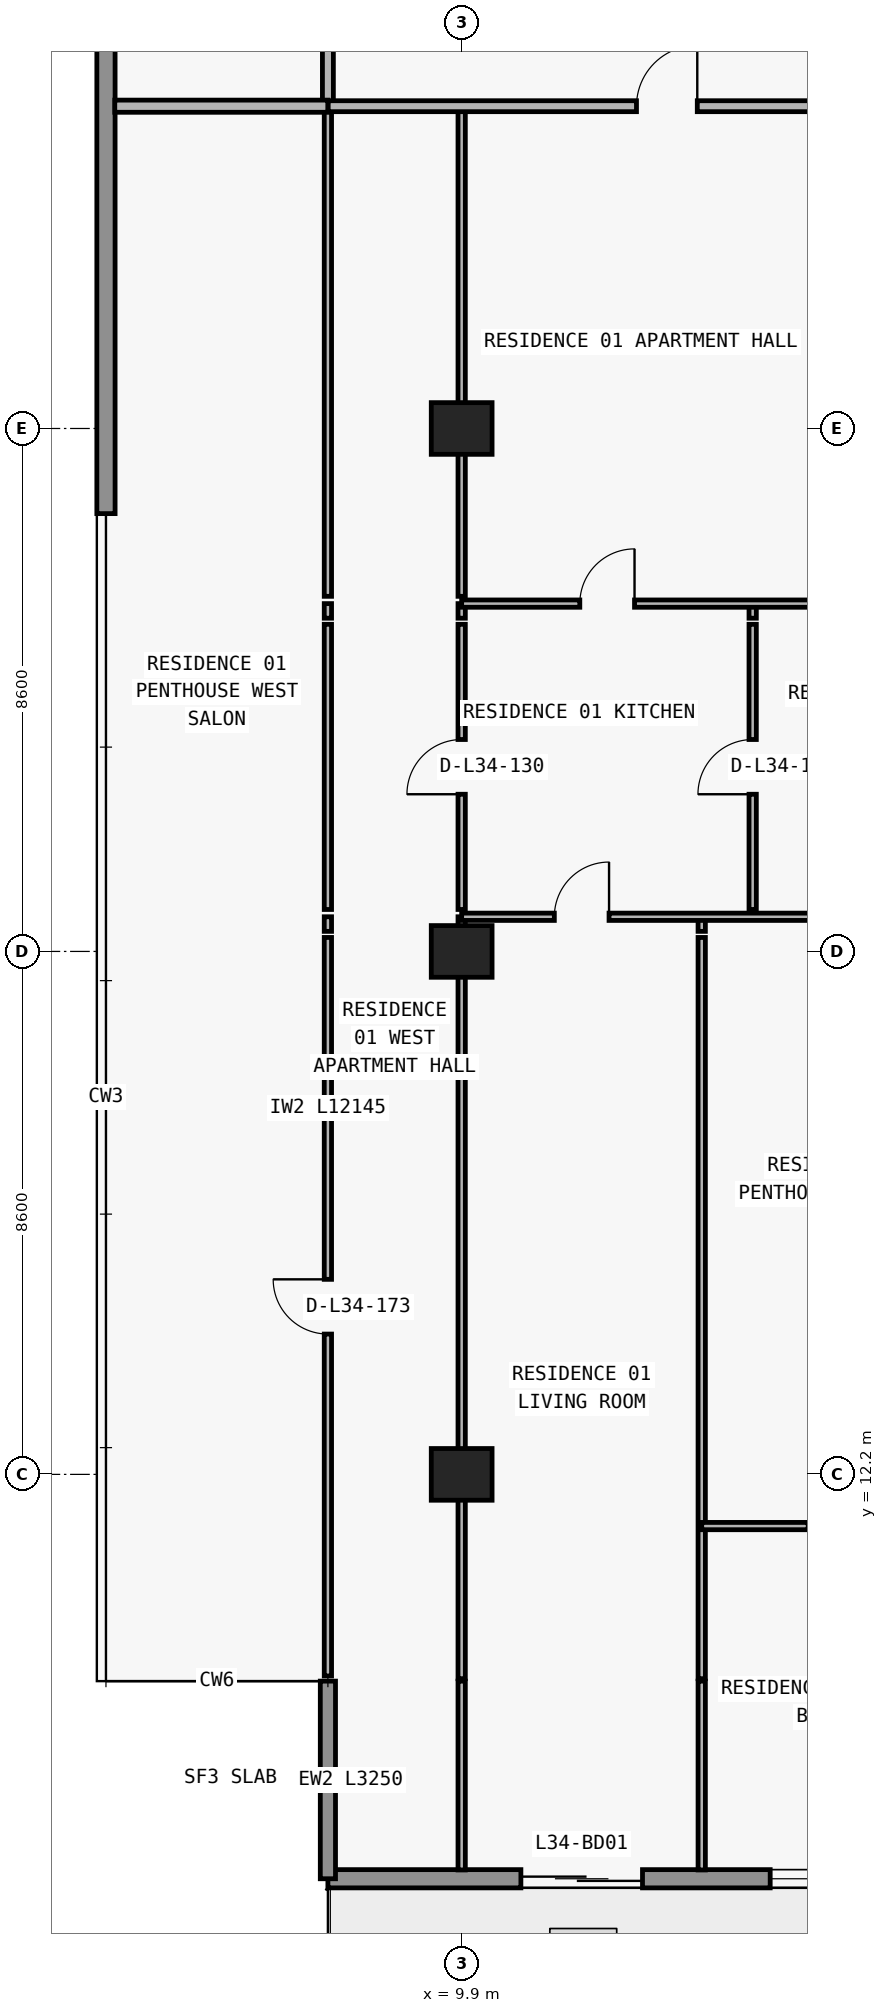
"""IFC4 building model, lengths in metres.
Left out: names, types, materials, properties, quantities, classifications, styles, units other than length and angle.
Written with IfcOpenShell. Run it as: python <this file> out.ifc"""

import sys

from ifc_helpers import new_model, si_unit, direction, frame, frame_2d, origin, origin_2d, place, context, subcontext, project, spatial, rectangle, extrude, element, fill, save


model = new_model("IFC4")
c1 = context("Model", 3, precision=1e-05, world=origin(), true_north=direction((0.0, 1.0)))
c2 = subcontext(c1, "Body", "Model", "MODEL_VIEW")
j1 = project(units=[si_unit("LENGTHUNIT", "METRE"), si_unit("PLANEANGLEUNIT", "RADIAN")], contexts=[c1])
p1 = place(None, origin())
s1 = spatial("IfcSite", under=j1, at=p1, CompositionType="ELEMENT")
p2 = place(p1, origin())
s2 = spatial("IfcBuilding", under=s1, at=p2, CompositionType="ELEMENT")
p3 = place(p2, frame((0.0, 0.0, 125.7)))
s3 = spatial("IfcBuildingStorey", under=s2, at=p3, CompositionType="ELEMENT", Elevation=125.7)
for number, where, z_axis, x_axis in (
    (1, (9.9, 12.2, 0.0), (0.0, 0.0, 1.0), (1.0, 0.0, 0.0)),
    (2, (9.9, 20.8, 0.0), (0.0, 0.0, 1.0), (1.0, 0.0, 0.0)),
    (3, (9.9, 29.4, 0.0), (0.0, 0.0, 1.0), (1.0, 0.0, 0.0)),
):
    element("IfcColumn", number, at=place(p3, frame(where, z_axis=z_axis, x_axis=x_axis)), inside=s3, PredefinedType="COLUMN", context=c2, shape_type="SweptSolid", body=[
        extrude(rectangle(XDim=1.0, YDim=0.85, at=origin_2d()), origin(), (0.0, 0.0, 1.0), 3.05),
    ])
p4 = place(p3, frame((70.1, 5.55, 0.0), z_axis=(0.0, 0.0, 1.0), x_axis=(-1.0, 0.0, 0.0)))
e4 = element("IfcWall", 4, at=p4, inside=s3, PredefinedType="STANDARD", context=c2, shape_type="SweptSolid", body=[
    extrude(rectangle(XDim=62.4, YDim=0.3, at=frame_2d((31.2, 0.0))), origin(), (0.0, 0.0, 1.0), 3.05),
])
p5 = place(p4, frame((57.226, 0.0, 0.0)))
e5 = element("IfcOpeningElement", 5, at=p5, cuts=e4, PredefinedType="OPENING", context=c2, shape_type="SweptSolid", body=[
    extrude(rectangle(XDim=2.0, YDim=2.3, at=frame_2d((1.0, 1.15))), frame((0.0, 0.16, 0.0), z_axis=(0.0, -1.0, 0.0), x_axis=(1.0, 0.0, 0.0)), (0.0, 0.0, 1.0), 0.32),
])
p6 = place(p4, frame((52.926, 0.0, 0.85)))
e6 = element("IfcOpeningElement", 6, at=p6, cuts=e4, PredefinedType="OPENING", context=c2, shape_type="SweptSolid", body=[
    extrude(rectangle(XDim=2.2, YDim=1.55, at=frame_2d((1.1, 0.775))), frame((0.0, 0.16, 0.0), z_axis=(0.0, -1.0, 0.0), x_axis=(1.0, 0.0, 0.0)), (0.0, 0.0, 1.0), 0.32),
])
p7 = place(p4, frame((48.49, 0.0, 0.0)))
e7 = element("IfcOpeningElement", 7, at=p7, cuts=e4, PredefinedType="OPENING", context=c2, shape_type="SweptSolid", body=[
    extrude(rectangle(XDim=2.0, YDim=2.3, at=frame_2d((1.0, 1.15))), frame((0.0, 0.16, 0.0), z_axis=(0.0, -1.0, 0.0), x_axis=(1.0, 0.0, 0.0)), (0.0, 0.0, 1.0), 0.32),
])
p8 = place(p4, frame((44.39, 0.0, 0.85)))
e8 = element("IfcOpeningElement", 8, at=p8, cuts=e4, PredefinedType="OPENING", context=c2, shape_type="SweptSolid", body=[
    extrude(rectangle(XDim=1.8, YDim=1.55, at=frame_2d((0.9, 0.775))), frame((0.0, 0.16, 0.0), z_axis=(0.0, -1.0, 0.0), x_axis=(1.0, 0.0, 0.0)), (0.0, 0.0, 1.0), 0.32),
])
p9 = place(p4, frame((40.426, 0.0, 0.0)))
e9 = element("IfcOpeningElement", 9, at=p9, cuts=e4, PredefinedType="OPENING", context=c2, shape_type="SweptSolid", body=[
    extrude(rectangle(XDim=2.0, YDim=2.3, at=frame_2d((1.0, 1.15))), frame((0.0, 0.16, 0.0), z_axis=(0.0, -1.0, 0.0), x_axis=(1.0, 0.0, 0.0)), (0.0, 0.0, 1.0), 0.32),
])
p10 = place(p4, frame((36.126, 0.0, 0.85)))
e10 = element("IfcOpeningElement", 10, at=p10, cuts=e4, PredefinedType="OPENING", context=c2, shape_type="SweptSolid", body=[
    extrude(rectangle(XDim=2.2, YDim=1.55, at=frame_2d((1.1, 0.775))), frame((0.0, 0.16, 0.0), z_axis=(0.0, -1.0, 0.0), x_axis=(1.0, 0.0, 0.0)), (0.0, 0.0, 1.0), 0.32),
])
p11 = place(p4, frame((31.91, 0.0, 0.0)))
e11 = element("IfcOpeningElement", 11, at=p11, cuts=e4, PredefinedType="OPENING", context=c2, shape_type="SweptSolid", body=[
    extrude(rectangle(XDim=2.0, YDim=2.3, at=frame_2d((1.0, 1.15))), frame((0.0, 0.16, 0.0), z_axis=(0.0, -1.0, 0.0), x_axis=(1.0, 0.0, 0.0)), (0.0, 0.0, 1.0), 0.32),
])
p12 = place(p4, frame((28.21, 0.0, 0.85)))
e12 = element("IfcOpeningElement", 12, at=p12, cuts=e4, PredefinedType="OPENING", context=c2, shape_type="SweptSolid", body=[
    extrude(rectangle(XDim=1.8, YDim=1.55, at=frame_2d((0.9, 0.775))), frame((0.0, 0.16, 0.0), z_axis=(0.0, -1.0, 0.0), x_axis=(1.0, 0.0, 0.0)), (0.0, 0.0, 1.0), 0.32),
])
p13 = place(p4, frame((24.426, 0.0, 0.0)))
e13 = element("IfcOpeningElement", 13, at=p13, cuts=e4, PredefinedType="OPENING", context=c2, shape_type="SweptSolid", body=[
    extrude(rectangle(XDim=2.0, YDim=2.3, at=frame_2d((1.0, 1.15))), frame((0.0, 0.16, 0.0), z_axis=(0.0, -1.0, 0.0), x_axis=(1.0, 0.0, 0.0)), (0.0, 0.0, 1.0), 0.32),
])
p14 = place(p4, frame((20.126, 0.0, 0.85)))
e14 = element("IfcOpeningElement", 14, at=p14, cuts=e4, PredefinedType="OPENING", context=c2, shape_type="SweptSolid", body=[
    extrude(rectangle(XDim=2.2, YDim=1.55, at=frame_2d((1.1, 0.775))), frame((0.0, 0.16, 0.0), z_axis=(0.0, -1.0, 0.0), x_axis=(1.0, 0.0, 0.0)), (0.0, 0.0, 1.0), 0.32),
])
p15 = place(p4, frame((15.69, 0.0, 0.0)))
e15 = element("IfcOpeningElement", 15, at=p15, cuts=e4, PredefinedType="OPENING", context=c2, shape_type="SweptSolid", body=[
    extrude(rectangle(XDim=2.0, YDim=2.3, at=frame_2d((1.0, 1.15))), frame((0.0, 0.16, 0.0), z_axis=(0.0, -1.0, 0.0), x_axis=(1.0, 0.0, 0.0)), (0.0, 0.0, 1.0), 0.32),
])
p16 = place(p4, frame((11.59, 0.0, 0.85)))
e16 = element("IfcOpeningElement", 16, at=p16, cuts=e4, PredefinedType="OPENING", context=c2, shape_type="SweptSolid", body=[
    extrude(rectangle(XDim=1.8, YDim=1.55, at=frame_2d((0.9, 0.775))), frame((0.0, 0.16, 0.0), z_axis=(0.0, -1.0, 0.0), x_axis=(1.0, 0.0, 0.0)), (0.0, 0.0, 1.0), 0.32),
])
p17 = place(p4, frame((7.626, 0.0, 0.0)))
e17 = element("IfcOpeningElement", 17, at=p17, cuts=e4, PredefinedType="OPENING", context=c2, shape_type="SweptSolid", body=[
    extrude(rectangle(XDim=2.0, YDim=2.3, at=frame_2d((1.0, 1.15))), frame((0.0, 0.16, 0.0), z_axis=(0.0, -1.0, 0.0), x_axis=(1.0, 0.0, 0.0)), (0.0, 0.0, 1.0), 0.32),
])
p18 = place(p4, frame((3.326, 0.0, 0.85)))
e18 = element("IfcOpeningElement", 18, at=p18, cuts=e4, PredefinedType="OPENING", context=c2, shape_type="SweptSolid", body=[
    extrude(rectangle(XDim=2.2, YDim=1.55, at=frame_2d((1.1, 0.775))), frame((0.0, 0.16, 0.0), z_axis=(0.0, -1.0, 0.0), x_axis=(1.0, 0.0, 0.0)), (0.0, 0.0, 1.0), 0.32),
])
p19 = place(p3, frame((7.7, 8.8, 0.0), z_axis=(0.0, 0.0, 1.0), x_axis=(0.0, -1.0, 0.0)))
e19 = element("IfcWall", 19, at=p19, inside=s3, PredefinedType="ELEMENTEDWALL", context=c2, shape_type="SweptSolid", body=[
    extrude(rectangle(XDim=3.25, YDim=0.25, at=frame_2d((1.625, 0.0))), origin(), (0.0, 0.0, 1.0), 3.05),
])
p20 = place(p3, frame((4.05, 28.0, 0.0), z_axis=(0.0, 0.0, 1.0), x_axis=(0.0, 1.0, 0.0)))
e20 = element("IfcWall", 20, at=p20, inside=s3, PredefinedType="STANDARD", context=c2, shape_type="SweptSolid", body=[
    extrude(rectangle(XDim=19.2, YDim=0.3, at=frame_2d((9.6, 0.0))), origin(), (0.0, 0.0, 1.0), 3.05),
])
p21 = place(p3, frame((7.7, 8.885, 0.0), z_axis=(0.0, 0.0, 1.0), x_axis=(0.0, 1.0, 0.0)))
e21 = element("IfcWall", 21, at=p21, inside=s3, PredefinedType="PARTITIONING", context=c2, shape_type="SweptSolid", body=[
    extrude(rectangle(XDim=12.145, YDim=0.12, at=frame_2d((6.073, 0.0))), origin(), (0.0, 0.0, 1.0), 3.05),
])
p22 = place(p21, frame((5.623, 0.0, 0.0)))
e22 = element("IfcOpeningElement", 22, at=p22, cuts=e21, PredefinedType="OPENING", context=c2, shape_type="SweptSolid", body=[
    extrude(rectangle(XDim=0.9, YDim=2.15, at=frame_2d((0.45, 1.075))), frame((0.0, 0.07, 0.0), z_axis=(0.0, -1.0, 0.0), x_axis=(1.0, 0.0, 0.0)), (0.0, 0.0, 1.0), 0.14),
])
p23 = place(p3, frame((7.7, 21.13, 0.0), z_axis=(0.0, 0.0, 1.0), x_axis=(0.0, 1.0, 0.0)))
e23 = element("IfcWall", 23, at=p23, inside=s3, PredefinedType="PARTITIONING", context=c2, shape_type="SweptSolid", body=[
    extrude(rectangle(XDim=0.24, YDim=0.12, at=frame_2d((0.12, 0.0))), origin(), (0.0, 0.0, 1.0), 3.05),
])
p24 = place(p3, frame((7.7, 21.49, 0.0), z_axis=(0.0, 0.0, 1.0), x_axis=(0.0, 1.0, 0.0)))
e24 = element("IfcWall", 24, at=p24, inside=s3, PredefinedType="PARTITIONING", context=c2, shape_type="SweptSolid", body=[
    extrude(rectangle(XDim=4.69, YDim=0.12, at=frame_2d((2.345, 0.0))), origin(), (0.0, 0.0, 1.0), 3.05),
])
p25 = place(p3, frame((7.7, 26.28, 0.0), z_axis=(0.0, 0.0, 1.0), x_axis=(0.0, 1.0, 0.0)))
e25 = element("IfcWall", 25, at=p25, inside=s3, PredefinedType="PARTITIONING", context=c2, shape_type="SweptSolid", body=[
    extrude(rectangle(XDim=0.24, YDim=0.12, at=frame_2d((0.12, 0.0))), origin(), (0.0, 0.0, 1.0), 3.05),
])
p26 = place(p3, frame((7.7, 26.64, 0.0), z_axis=(0.0, 0.0, 1.0), x_axis=(0.0, 1.0, 0.0)))
e26 = element("IfcWall", 26, at=p26, inside=s3, PredefinedType="PARTITIONING", context=c2, shape_type="SweptSolid", body=[
    extrude(rectangle(XDim=8.06, YDim=0.12, at=frame_2d((4.03, 0.0))), origin(), (0.0, 0.0, 1.0), 3.05),
])
p27 = place(p3, frame((7.7, 34.705, 0.0), z_axis=(0.0, 0.0, 1.0), x_axis=(0.0, 1.0, 0.0)))
e27 = element("IfcWall", 27, at=p27, inside=s3, PredefinedType="PARTITIONING", context=c2, shape_type="SweptSolid", body=[
    extrude(rectangle(XDim=2.245, YDim=0.18, at=frame_2d((1.123, 0.0))), origin(), (0.0, 0.0, 1.0), 3.05),
])
p28 = place(p3, frame((9.9, 5.695, 0.0), z_axis=(0.0, 0.0, 1.0), x_axis=(0.0, 1.0, 0.0)))
e28 = element("IfcWall", 28, at=p28, inside=s3, PredefinedType="PARTITIONING", context=c2, shape_type="SweptSolid", body=[
    extrude(rectangle(XDim=3.105, YDim=0.12, at=frame_2d((1.552, 0.0))), origin(), (0.0, 0.0, 1.0), 3.05),
])
p29 = place(p3, frame((9.9, 8.84, 0.0), z_axis=(0.0, 0.0, 1.0), x_axis=(0.0, 1.0, 0.0)))
e29 = element("IfcWall", 29, at=p29, inside=s3, PredefinedType="PARTITIONING", context=c2, shape_type="SweptSolid", body=[
    extrude(rectangle(XDim=12.19, YDim=0.12, at=frame_2d((6.095, 0.0))), origin(), (0.0, 0.0, 1.0), 2.174),
])
p30 = place(p3, frame((9.9, 21.13, 0.0), z_axis=(0.0, 0.0, 1.0), x_axis=(0.0, 1.0, 0.0)))
e30 = element("IfcWall", 30, at=p30, inside=s3, PredefinedType="PARTITIONING", context=c2, shape_type="SweptSolid", body=[
    extrude(rectangle(XDim=0.24, YDim=0.12, at=frame_2d((0.12, 0.0))), origin(), (0.0, 0.0, 1.0), 2.174),
])
p31 = place(p3, frame((9.9, 21.49, 0.0), z_axis=(0.0, 0.0, 1.0), x_axis=(0.0, 1.0, 0.0)))
e31 = element("IfcWall", 31, at=p31, inside=s3, PredefinedType="PARTITIONING", context=c2, shape_type="SweptSolid", body=[
    extrude(rectangle(XDim=4.69, YDim=0.12, at=frame_2d((2.345, 0.0))), origin(), (0.0, 0.0, 1.0), 2.174),
])
p32 = place(p31, frame((1.895, 0.0, 0.0)))
e32 = element("IfcOpeningElement", 32, at=p32, cuts=e31, PredefinedType="OPENING", context=c2, shape_type="SweptSolid", body=[
    extrude(rectangle(XDim=0.9, YDim=2.124, at=frame_2d((0.45, 1.062))), frame((0.0, 0.07, 0.0), z_axis=(0.0, -1.0, 0.0), x_axis=(1.0, 0.0, 0.0)), (0.0, 0.0, 1.0), 0.14),
])
p33 = place(p3, frame((9.9, 26.28, 0.0), z_axis=(0.0, 0.0, 1.0), x_axis=(0.0, 1.0, 0.0)))
e33 = element("IfcWall", 33, at=p33, inside=s3, PredefinedType="PARTITIONING", context=c2, shape_type="SweptSolid", body=[
    extrude(rectangle(XDim=0.24, YDim=0.12, at=frame_2d((0.12, 0.0))), origin(), (0.0, 0.0, 1.0), 2.174),
])
p34 = place(p3, frame((9.9, 26.64, 0.0), z_axis=(0.0, 0.0, 1.0), x_axis=(0.0, 1.0, 0.0)))
e34 = element("IfcWall", 34, at=p34, inside=s3, PredefinedType="PARTITIONING", context=c2, shape_type="SweptSolid", body=[
    extrude(rectangle(XDim=8.06, YDim=0.12, at=frame_2d((4.03, 0.0))), origin(), (0.0, 0.0, 1.0), 2.174),
])
p35 = place(p3, frame((13.848, 5.695, 0.0), z_axis=(0.0, 0.0, 1.0), x_axis=(0.0, 1.0, 0.0)))
e35 = element("IfcWall", 35, at=p35, inside=s3, PredefinedType="PARTITIONING", context=c2, shape_type="SweptSolid", body=[
    extrude(rectangle(XDim=3.105, YDim=0.12, at=frame_2d((1.552, 0.0))), origin(), (0.0, 0.0, 1.0), 3.05),
])
p36 = place(p3, frame((13.848, 8.84, 0.0), z_axis=(0.0, 0.0, 1.0), x_axis=(0.0, 1.0, 0.0)))
e36 = element("IfcWall", 36, at=p36, inside=s3, PredefinedType="PARTITIONING", context=c2, shape_type="SweptSolid", body=[
    extrude(rectangle(XDim=12.19, YDim=0.12, at=frame_2d((6.095, 0.0))), origin(), (0.0, 0.0, 1.0), 3.05),
])
p37 = place(p3, frame((13.848, 21.13, 0.0), z_axis=(0.0, 0.0, 1.0), x_axis=(0.0, 1.0, 0.0)))
e37 = element("IfcWall", 37, at=p37, inside=s3, PredefinedType="PARTITIONING", context=c2, shape_type="SweptSolid", body=[
    extrude(rectangle(XDim=0.24, YDim=0.12, at=frame_2d((0.12, 0.0))), origin(), (0.0, 0.0, 1.0), 3.05),
])
p38 = place(p3, frame((14.686, 21.49, 0.0), z_axis=(0.0, 0.0, 1.0), x_axis=(0.0, 1.0, 0.0)))
e38 = element("IfcWall", 38, at=p38, inside=s3, PredefinedType="PARTITIONING", context=c2, shape_type="SweptSolid", body=[
    extrude(rectangle(XDim=4.69, YDim=0.12, at=frame_2d((2.345, 0.0))), origin(), (0.0, 0.0, 1.0), 3.05),
])
p39 = place(p38, frame((1.895, 0.0, 0.0)))
e39 = element("IfcOpeningElement", 39, at=p39, cuts=e38, PredefinedType="OPENING", context=c2, shape_type="SweptSolid", body=[
    extrude(rectangle(XDim=0.9, YDim=2.15, at=frame_2d((0.45, 1.075))), frame((0.0, 0.07, 0.0), z_axis=(0.0, -1.0, 0.0), x_axis=(1.0, 0.0, 0.0)), (0.0, 0.0, 1.0), 0.14),
])
p40 = place(p3, frame((14.686, 26.28, 0.0), z_axis=(0.0, 0.0, 1.0), x_axis=(0.0, 1.0, 0.0)))
e40 = element("IfcWall", 40, at=p40, inside=s3, PredefinedType="PARTITIONING", context=c2, shape_type="SweptSolid", body=[
    extrude(rectangle(XDim=0.24, YDim=0.12, at=frame_2d((0.12, 0.0))), origin(), (0.0, 0.0, 1.0), 3.05),
])
p41 = place(p3, frame((13.848, 11.35, 0.0), z_axis=(0.0, 0.0, 1.0), x_axis=(1.0, 0.0, 0.0)))
e41 = element("IfcWall", 41, at=p41, inside=s3, PredefinedType="PARTITIONING", context=c2, shape_type="SweptSolid", body=[
    extrude(rectangle(XDim=4.402, YDim=0.12, at=frame_2d((2.201, 0.0))), origin(), (0.0, 0.0, 1.0), 3.05),
])
p42 = place(p41, frame((1.751, 0.0, 0.0)))
e42 = element("IfcOpeningElement", 42, at=p42, cuts=e41, PredefinedType="OPENING", context=c2, shape_type="SweptSolid", body=[
    extrude(rectangle(XDim=0.9, YDim=2.15, at=frame_2d((0.45, 1.075))), frame((0.0, 0.07, 0.0), z_axis=(0.0, -1.0, 0.0), x_axis=(1.0, 0.0, 0.0)), (0.0, 0.0, 1.0), 0.14),
])
p43 = place(p3, frame((9.9, 21.37, 0.0), z_axis=(0.0, 0.0, 1.0), x_axis=(1.0, 0.0, 0.0)))
e43 = element("IfcWall", 43, at=p43, inside=s3, PredefinedType="PARTITIONING", context=c2, shape_type="SweptSolid", body=[
    extrude(rectangle(XDim=8.35, YDim=0.12, at=frame_2d((4.175, 0.0))), origin(), (0.0, 0.0, 1.0), 3.05),
])
p44 = place(p43, frame((1.524, 0.0, 0.0)))
e44 = element("IfcOpeningElement", 44, at=p44, cuts=e43, PredefinedType="OPENING", context=c2, shape_type="SweptSolid", body=[
    extrude(rectangle(XDim=0.9, YDim=2.15, at=frame_2d((0.45, 1.075))), frame((0.0, 0.07, 0.0), z_axis=(0.0, -1.0, 0.0), x_axis=(1.0, 0.0, 0.0)), (0.0, 0.0, 1.0), 0.14),
])
p45 = place(p43, frame((6.118, 0.0, 0.0)))
e45 = element("IfcOpeningElement", 45, at=p45, cuts=e43, PredefinedType="OPENING", context=c2, shape_type="SweptSolid", body=[
    extrude(rectangle(XDim=0.9, YDim=2.15, at=frame_2d((0.45, 1.075))), frame((0.0, 0.07, 0.0), z_axis=(0.0, -1.0, 0.0), x_axis=(1.0, 0.0, 0.0)), (0.0, 0.0, 1.0), 0.14),
])
p46 = place(p3, frame((9.9, 26.52, 0.0), z_axis=(0.0, 0.0, 1.0), x_axis=(1.0, 0.0, 0.0)))
e46 = element("IfcWall", 46, at=p46, inside=s3, PredefinedType="PARTITIONING", context=c2, shape_type="SweptSolid", body=[
    extrude(rectangle(XDim=8.35, YDim=0.12, at=frame_2d((4.175, 0.0))), origin(), (0.0, 0.0, 1.0), 3.05),
])
p47 = place(p46, frame((1.943, 0.0, 0.0)))
e47 = element("IfcOpeningElement", 47, at=p47, cuts=e46, PredefinedType="OPENING", context=c2, shape_type="SweptSolid", body=[
    extrude(rectangle(XDim=0.9, YDim=2.15, at=frame_2d((0.45, 1.075))), frame((0.0, 0.07, 0.0), z_axis=(0.0, -1.0, 0.0), x_axis=(1.0, 0.0, 0.0)), (0.0, 0.0, 1.0), 0.14),
])
p48 = place(p3, frame((4.195, 34.7, 0.0), z_axis=(0.0, 0.0, 1.0), x_axis=(1.0, 0.0, 0.0)))
e48 = element("IfcWall", 48, at=p48, inside=s3, PredefinedType="PARTITIONING", context=c2, shape_type="SweptSolid", body=[
    extrude(rectangle(XDim=3.505, YDim=0.2, at=frame_2d((1.752, 0.0))), origin(), (0.0, 0.0, 1.0), 3.05),
])
p49 = place(p3, frame((7.705, 34.7, 0.0), z_axis=(0.0, 0.0, 1.0), x_axis=(1.0, 0.0, 0.0)))
e49 = element("IfcWall", 49, at=p49, inside=s3, PredefinedType="PARTITIONING", context=c2, shape_type="SweptSolid", body=[
    extrude(rectangle(XDim=10.545, YDim=0.18, at=frame_2d((5.272, 0.0))), origin(), (0.0, 0.0, 1.0), 3.05),
])
p50 = place(p49, frame((5.07, 0.0, 0.0)))
e50 = element("IfcOpeningElement", 50, at=p50, cuts=e49, PredefinedType="OPENING", context=c2, shape_type="SweptSolid", body=[
    extrude(rectangle(XDim=1.0, YDim=2.2, at=frame_2d((0.5, 1.1))), frame((0.0, 0.1, 0.0), z_axis=(0.0, -1.0, 0.0), x_axis=(1.0, 0.0, 0.0)), (0.0, 0.0, 1.0), 0.2),
])
p51 = place(p5, origin())
e51 = element("IfcDoor", 51, at=p51, inside=s3, OperationType="DOUBLE_DOOR_SLIDING", PredefinedType="DOOR", context=c2, shape_type="SweptSolid", body=[
    extrude(rectangle(XDim=2.0, YDim=2.3, at=frame_2d((1.0, 1.15))), frame((0.0, 0.025, 0.0), z_axis=(0.0, -1.0, 0.0), x_axis=(1.0, 0.0, 0.0)), (0.0, 0.0, 1.0), 0.05),
])
fill(e5, e51)
p52 = place(p6, origin())
e52 = element("IfcWindow", 52, at=p52, inside=s3, PartitioningType="SINGLE_PANEL", PredefinedType="WINDOW", context=c2, shape_type="SweptSolid", body=[
    extrude(rectangle(XDim=2.2, YDim=1.55, at=frame_2d((1.1, 0.775))), frame((0.0, 0.03, 0.0), z_axis=(0.0, -1.0, 0.0), x_axis=(1.0, 0.0, 0.0)), (0.0, 0.0, 1.0), 0.06),
])
fill(e6, e52)
p53 = place(p50, origin())
e53 = element("IfcDoor", 53, at=p53, inside=s3, OperationType="SINGLE_SWING_RIGHT", PredefinedType="DOOR", context=c2, shape_type="SweptSolid", body=[
    extrude(rectangle(XDim=1.0, YDim=2.2, at=frame_2d((0.5, 1.1))), frame((0.0, 0.025, 0.0), z_axis=(0.0, -1.0, 0.0), x_axis=(1.0, 0.0, 0.0)), (0.0, 0.0, 1.0), 0.05),
])
fill(e50, e53)
p54 = place(p47, origin())
e54 = element("IfcDoor", 54, at=p54, inside=s3, OperationType="SINGLE_SWING_RIGHT", PredefinedType="DOOR", context=c2, shape_type="SweptSolid", body=[
    extrude(rectangle(XDim=0.9, YDim=2.15, at=frame_2d((0.45, 1.075))), frame((0.0, 0.025, 0.0), z_axis=(0.0, -1.0, 0.0), x_axis=(1.0, 0.0, 0.0)), (0.0, 0.0, 1.0), 0.05),
])
fill(e47, e54)
p55 = place(p39, origin())
e55 = element("IfcDoor", 55, at=p55, inside=s3, OperationType="SINGLE_SWING_LEFT", PredefinedType="DOOR", context=c2, shape_type="SweptSolid", body=[
    extrude(rectangle(XDim=0.9, YDim=2.15, at=frame_2d((0.45, 1.075))), frame((0.0, 0.025, 0.0), z_axis=(0.0, -1.0, 0.0), x_axis=(1.0, 0.0, 0.0)), (0.0, 0.0, 1.0), 0.05),
])
fill(e39, e55)
p56 = place(p44, origin())
e56 = element("IfcDoor", 56, at=p56, inside=s3, OperationType="SINGLE_SWING_RIGHT", PredefinedType="DOOR", context=c2, shape_type="SweptSolid", body=[
    extrude(rectangle(XDim=0.9, YDim=2.15, at=frame_2d((0.45, 1.075))), frame((0.0, 0.025, 0.0), z_axis=(0.0, -1.0, 0.0), x_axis=(1.0, 0.0, 0.0)), (0.0, 0.0, 1.0), 0.05),
])
fill(e44, e56)
p57 = place(p32, origin())
e57 = element("IfcDoor", 57, at=p57, inside=s3, OperationType="SINGLE_SWING_LEFT", PredefinedType="DOOR", context=c2, shape_type="SweptSolid", body=[
    extrude(rectangle(XDim=0.9, YDim=2.124, at=frame_2d((0.45, 1.062))), frame((0.0, 0.025, 0.0), z_axis=(0.0, -1.0, 0.0), x_axis=(1.0, 0.0, 0.0)), (0.0, 0.0, 1.0), 0.05),
])
fill(e32, e57)
p58 = place(p22, origin())
e58 = element("IfcDoor", 58, at=p58, inside=s3, OperationType="SINGLE_SWING_RIGHT", PredefinedType="DOOR", context=c2, shape_type="SweptSolid", body=[
    extrude(rectangle(XDim=0.9, YDim=2.15, at=frame_2d((0.45, 1.075))), frame((0.0, 0.025, 0.0), z_axis=(0.0, -1.0, 0.0), x_axis=(1.0, 0.0, 0.0)), (0.0, 0.0, 1.0), 0.05),
])
fill(e22, e58)
save(model, sys.argv[1])
